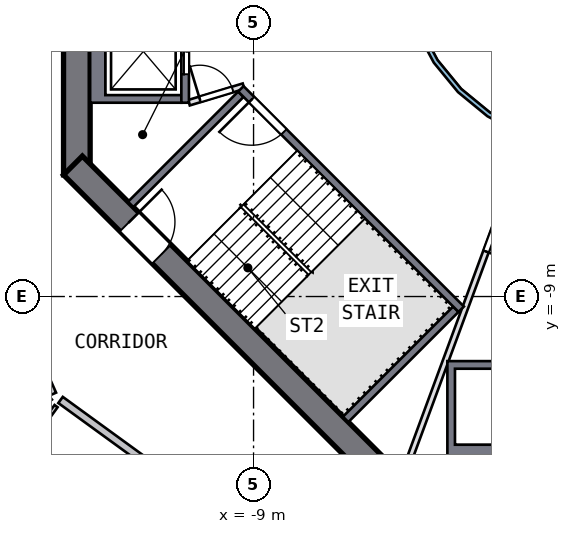
"""IFC4 building model, lengths in metres.
Left out: names, types, materials, properties, quantities, classifications, styles, units other than length and angle.
Written with IfcOpenShell. Run it as: python <this file> out.ifc"""

import sys

from ifc_helpers import new_model, si_unit, direction, frame, frame_2d, origin, place, context, subcontext, project, spatial, polyline, rectangle, outline, extrude, element, fill, save


model = new_model("IFC4")
c1 = context("Model", 3, precision=1e-05, world=origin(), true_north=direction((0.0, 1.0)))
c2 = subcontext(c1, "Body", "Model", "MODEL_VIEW")
j1 = project(units=[si_unit("LENGTHUNIT", "METRE"), si_unit("PLANEANGLEUNIT", "RADIAN")], contexts=[c1])
p1 = place(None, origin())
s1 = spatial("IfcSite", under=j1, at=p1, CompositionType="ELEMENT")
p2 = place(p1, origin())
s2 = spatial("IfcBuilding", under=s1, at=p2, CompositionType="ELEMENT")
p3 = place(p2, frame((0.0, 0.0, 133.0)))
s3 = spatial("IfcBuildingStorey", under=s2, at=p3, CompositionType="ELEMENT", Elevation=133.0)
p4 = place(p3, frame((-13.65, 5.799, 0.0), z_axis=(0.0, 0.0, 1.0), x_axis=(0.0, -1.0, 0.0)))
e1 = element("IfcWall", 1, at=p4, inside=s3, PredefinedType="SHEAR", context=c2, shape_type="SweptSolid", body=[
    extrude(rectangle(XDim=11.598, YDim=0.7, at=frame_2d((5.799, 0.0))), origin(), (0.0, 0.0, 1.0), 3.5),
])
p5 = place(p4, frame((4.899, 0.0, 0.0)))
e2 = element("IfcOpeningElement", 2, at=p5, cuts=e1, PredefinedType="OPENING", context=c2, shape_type="SweptSolid", body=[
    extrude(rectangle(XDim=1.8, YDim=2.1, at=frame_2d((0.9, 1.05))), frame((0.0, 0.36, 0.0), z_axis=(0.0, -1.0, 0.0), x_axis=(1.0, 0.0, 0.0)), (0.0, 0.0, 1.0), 0.72),
])
p6 = place(p3, frame((-13.752, -5.552, 0.0), z_axis=(0.0, 0.0, 1.0), x_axis=(0.707106781, -0.707106781, 0.0)))
e3 = element("IfcWall", 3, at=p6, inside=s3, PredefinedType="SHEAR", context=c2, shape_type="SweptSolid", body=[
    extrude(rectangle(XDim=11.598, YDim=0.7, at=frame_2d((5.799, 0.0))), origin(), (0.0, 0.0, 1.0), 3.5),
])
p7 = place(p6, frame((2.099, 0.0, 0.0)))
e4 = element("IfcOpeningElement", 4, at=p7, cuts=e3, PredefinedType="OPENING", context=c2, shape_type="SweptSolid", body=[
    extrude(rectangle(XDim=1.2, YDim=2.1, at=frame_2d((0.6, 1.05))), frame((0.0, 0.36, 0.0), z_axis=(0.0, -1.0, 0.0), x_axis=(1.0, 0.0, 0.0)), (0.0, 0.0, 1.0), 0.72),
])
p8 = place(p3, origin())
e5 = element("IfcWall", 5, at=p8, inside=s3, PredefinedType="SOLIDWALL", context=c2, shape_type="SweptSolid", body=[
    extrude(outline(polyline([(-13.3, -3.9), (-13.3, -1.2), (-10.9, -1.2), (-10.9, -1.4), (-12.9, -1.4), (-12.9, -3.7), (-10.9, -3.7), (-10.9, -3.9), (-13.3, -3.9)])), origin(), (0.0, 0.0, 1.0), 3.19),
])
p9 = place(p3, frame((-10.8, -1.2, 0.0), z_axis=(0.0, 0.0, 1.0), x_axis=(0.0, -1.0, 0.0)))
e6 = element("IfcWall", 6, at=p9, inside=s3, PredefinedType="SOLIDWALL", context=c2, shape_type="SweptSolid", body=[
    extrude(rectangle(XDim=2.7, YDim=0.2, at=frame_2d((1.35, 0.0))), origin(), (0.0, 0.0, 1.0), 3.19),
])
p10 = place(p9, frame((0.75, 0.0, 0.0)))
e7 = element("IfcOpeningElement", 7, at=p10, cuts=e6, PredefinedType="OPENING", context=c2, shape_type="SweptSolid", body=[
    extrude(rectangle(XDim=1.2, YDim=2.1, at=frame_2d((0.6, 1.05))), frame((0.0, 0.11, 0.0), z_axis=(0.0, -1.0, 0.0), x_axis=(1.0, 0.0, 0.0)), (0.0, 0.0, 1.0), 0.22),
])
p11 = place(p3, origin())
e8 = element("IfcWall", 8, at=p11, inside=s3, PredefinedType="SOLIDWALL", context=c2, shape_type="SweptSolid", body=[
    extrude(outline(polyline([(-1.2, -13.3), (-3.9, -13.3), (-3.9, -10.7), (-1.2, -10.7), (-1.2, -13.3)]), holes=[polyline([(-3.7, -10.9), (-3.7, -12.9), (-1.4, -12.9), (-1.4, -10.9), (-3.7, -10.9)])]), origin(), (0.0, 0.0, 1.0), 3.19),
])
p12 = place(p3, frame((-3.535, -9.334, 0.0), z_axis=(0.0, 0.0, 1.0), x_axis=(-0.707106781, 0.707106781, 0.0)))
e9 = element("IfcWall", 9, at=p12, inside=s3, PredefinedType="SOLIDWALL", context=c2, shape_type="SweptSolid", body=[
    extrude(rectangle(XDim=8.2, YDim=0.2, at=frame_2d((4.1, 0.0))), origin(), (0.0, 0.0, 1.0), 3.19),
])
p13 = place(p12, frame((6.6, 0.0, 0.0)))
e10 = element("IfcOpeningElement", 10, at=p13, cuts=e9, PredefinedType="OPENING", context=c2, shape_type="SweptSolid", body=[
    extrude(rectangle(XDim=1.2, YDim=2.1, at=frame_2d((0.6, 1.05))), frame((0.0, 0.11, 0.0), z_axis=(0.0, -1.0, 0.0), x_axis=(1.0, 0.0, 0.0)), (0.0, 0.0, 1.0), 0.22),
])
for number, where, z_axis, x_axis in (
    (11, (-9.334, -3.677, 0.0), (0.0, 0.0, 1.0), (-0.707, -0.707, 0.0)),
    (12, (-3.677, -9.334, 0.0), (0.0, 0.0, 1.0), (-0.707, -0.707, 0.0)),
):
    element("IfcWall", number, at=place(p3, frame(where, z_axis=z_axis, x_axis=x_axis)), inside=s3, PredefinedType="SOLIDWALL", context=c2, shape_type="SweptSolid", body=[
        extrude(rectangle(XDim=4.1, YDim=0.2, at=frame_2d((2.05, 0.0))), origin(), (0.0, 0.0, 1.0), 3.19),
    ])
p14 = place(p3, frame((-10.7, -3.9, 0.0), z_axis=(0.0, 0.0, 1.0), x_axis=(0.957084567, 0.289808785, 0.0)))
e13 = element("IfcWall", 13, at=p14, inside=s3, PredefinedType="PARTITIONING", context=c2, shape_type="SweptSolid", body=[
    extrude(rectangle(XDim=1.501, YDim=0.15, at=frame_2d((0.75, 0.0))), origin(), (0.0, 0.0, 1.0), 3.19),
])
p15 = place(p14, frame((0.301, 0.0, 0.0)))
e14 = element("IfcOpeningElement", 14, at=p15, cuts=e13, PredefinedType="OPENING", context=c2, shape_type="SweptSolid", body=[
    extrude(rectangle(XDim=0.9, YDim=2.1, at=frame_2d((0.45, 1.05))), frame((0.0, 0.085, 0.0), z_axis=(0.0, -1.0, 0.0), x_axis=(1.0, 0.0, 0.0)), (0.0, 0.0, 1.0), 0.17),
])
p16 = place(p3, frame((-1.776, -4.813, 0.0), z_axis=(0.0, 0.0, 1.0), x_axis=(-0.346109381, -0.938194168, 0.0)))
e15 = element("IfcWall", 15, at=p16, inside=s3, PredefinedType="PARTITIONING", context=c2, shape_type="SweptSolid", body=[
    extrude(rectangle(XDim=9.016, YDim=0.15, at=frame_2d((4.508, 0.0))), origin(), (0.0, 0.0, 1.0), 3.19),
])
p17 = place(p16, frame((1.4, 0.0, 0.0)))
e16 = element("IfcOpeningElement", 16, at=p17, cuts=e15, PredefinedType="OPENING", context=c2, shape_type="SweptSolid", body=[
    extrude(rectangle(XDim=1.8, YDim=2.1, at=frame_2d((0.9, 1.05))), frame((0.0, 0.085, 0.0), z_axis=(0.0, -1.0, 0.0), x_axis=(1.0, 0.0, 0.0)), (0.0, 0.0, 1.0), 0.17),
])
p18 = place(p3, origin())
e17 = element("IfcWall", 17, at=p18, inside=s3, PredefinedType="SOLIDWALL", context=c2, shape_type="SweptSolid", body=[
    extrude(outline(polyline([(5.021, -0.999), (4.73, -1.959), (4.257, -2.844), (3.62, -3.62), (2.844, -4.257), (1.959, -4.73), (0.999, -5.021), (0.0, -5.12), (-0.999, -5.021), (-1.959, -4.73), (-2.844, -4.257), (-3.62, -3.62), (-4.257, -2.844), (-4.73, -1.959), (-5.021, -0.999), (-5.12, 0.0), (-5.021, 0.999), (-4.73, 1.959), (-4.257, 2.844), (-3.62, 3.62), (-2.844, 4.257), (-1.959, 4.73), (-0.999, 5.021), (0.0, 5.12), (0.999, 5.021), (1.959, 4.73), (2.844, 4.257), (3.62, 3.62), (4.257, 2.844), (4.73, 1.959), (5.021, 0.999), (5.12, 0.0), (5.021, -0.999)]), holes=[polyline([(4.904, 0.976), (4.619, 1.913), (4.157, 2.778), (3.535, 3.535), (2.778, 4.157), (1.913, 4.619), (0.976, 4.904), (0.0, 5.0), (-0.976, 4.904), (-1.913, 4.619), (-2.778, 4.157), (-3.535, 3.535), (-4.157, 2.778), (-4.619, 1.913), (-4.904, 0.976), (-5.0, 0.0), (-4.904, -0.976), (-4.619, -1.913), (-4.157, -2.778), (-3.535, -3.535), (-2.778, -4.157), (-1.913, -4.619), (-0.976, -4.904), (0.0, -5.0), (0.976, -4.904), (1.913, -4.619), (2.778, -4.157), (3.535, -3.535), (4.157, -2.778), (4.619, -1.913), (4.904, -0.976), (5.0, 0.0), (4.904, 0.976)])]), origin(), (0.0, 0.0, 1.0), 3.19),
])
p19 = place(p3, frame((-14.288, -11.57, 0.0), z_axis=(0.0, 0.0, 1.0), x_axis=(-0.40673695, 0.913545321, 0.0)))
e18 = element("IfcWall", 18, at=p19, inside=s3, PredefinedType="SOLIDWALL", context=c2, shape_type="SweptSolid", body=[
    extrude(rectangle(XDim=9.537, YDim=0.2, at=frame_2d((4.768, 0.0))), origin(), (0.0, 0.0, 1.0), 3.19),
])
p20 = place(p19, frame((6.608, 0.0, 0.0)))
e19 = element("IfcOpeningElement", 19, at=p20, cuts=e18, PredefinedType="OPENING", context=c2, shape_type="SweptSolid", body=[
    extrude(rectangle(XDim=1.0, YDim=2.1, at=frame_2d((0.5, 1.05))), frame((0.0, 0.11, 0.0), z_axis=(0.0, -1.0, 0.0), x_axis=(1.0, 0.0, 0.0)), (0.0, 0.0, 1.0), 0.22),
])
p21 = place(p3, frame((-14.079, -11.722, 0.0), z_axis=(0.0, 0.0, 1.0), x_axis=(0.809015446, -0.587787383, 0.0)))
e20 = element("IfcWall", 20, at=p21, inside=s3, PredefinedType="SOLIDWALL", context=c2, shape_type="SweptSolid", body=[
    extrude(rectangle(XDim=3.4, YDim=0.2, at=frame_2d((1.7, 0.0))), origin(), (0.0, 0.0, 1.0), 3.19),
])
p22 = place(p3, frame((-14.196, -11.884, 0.0), z_axis=(0.0, 0.0, 1.0), x_axis=(-0.587762999, -0.809033162, 0.0)))
e21 = element("IfcWall", 21, at=p22, inside=s3, PredefinedType="PARTITIONING", context=c2, shape_type="SweptSolid", body=[
    extrude(rectangle(XDim=2.7, YDim=0.1, at=frame_2d((1.35, 0.0))), origin(), (0.0, 0.0, 1.0), 3.19),
])
p23 = place(p10, origin())
e22 = element("IfcDoor", 22, at=p23, inside=s3, OperationType="DOUBLE_DOOR_SLIDING", PredefinedType="DOOR", context=c2, shape_type="SweptSolid", body=[
    extrude(rectangle(XDim=1.2, YDim=2.1, at=frame_2d((0.6, 1.05))), frame((0.0, 0.025, 0.0), z_axis=(0.0, -1.0, 0.0), x_axis=(1.0, 0.0, 0.0)), (0.0, 0.0, 1.0), 0.05),
])
fill(e7, e22)
p24 = place(p13, origin())
e23 = element("IfcDoor", 23, at=p24, inside=s3, OperationType="SINGLE_SWING_RIGHT", PredefinedType="DOOR", context=c2, shape_type="SweptSolid", body=[
    extrude(rectangle(XDim=1.2, YDim=2.1, at=frame_2d((0.6, 1.05))), frame((0.0, 0.025, 0.0), z_axis=(0.0, -1.0, 0.0), x_axis=(1.0, 0.0, 0.0)), (0.0, 0.0, 1.0), 0.05),
])
fill(e10, e23)
p25 = place(p7, origin())
e24 = element("IfcDoor", 24, at=p25, inside=s3, OperationType="SINGLE_SWING_LEFT", PredefinedType="DOOR", context=c2, shape_type="SweptSolid", body=[
    extrude(rectangle(XDim=1.2, YDim=2.1, at=frame_2d((0.6, 1.05))), frame((0.0, 0.025, 0.0), z_axis=(0.0, -1.0, 0.0), x_axis=(1.0, 0.0, 0.0)), (0.0, 0.0, 1.0), 0.05),
])
fill(e4, e24)
p26 = place(p15, origin())
e25 = element("IfcDoor", 25, at=p26, inside=s3, OperationType="SINGLE_SWING_LEFT", PredefinedType="DOOR", context=c2, shape_type="SweptSolid", body=[
    extrude(rectangle(XDim=0.9, YDim=2.1, at=frame_2d((0.45, 1.05))), frame((0.0, 0.025, 0.0), z_axis=(0.0, -1.0, 0.0), x_axis=(1.0, 0.0, 0.0)), (0.0, 0.0, 1.0), 0.05),
])
fill(e14, e25)
p27 = place(p17, origin())
e26 = element("IfcDoor", 26, at=p27, inside=s3, OperationType="DOUBLE_DOOR_SINGLE_SWING", PredefinedType="DOOR", context=c2, shape_type="SweptSolid", body=[
    extrude(rectangle(XDim=1.8, YDim=2.1, at=frame_2d((0.9, 1.05))), frame((0.0, 0.025, 0.0), z_axis=(0.0, -1.0, 0.0), x_axis=(1.0, 0.0, 0.0)), (0.0, 0.0, 1.0), 0.05),
])
fill(e16, e26)
save(model, sys.argv[1])
